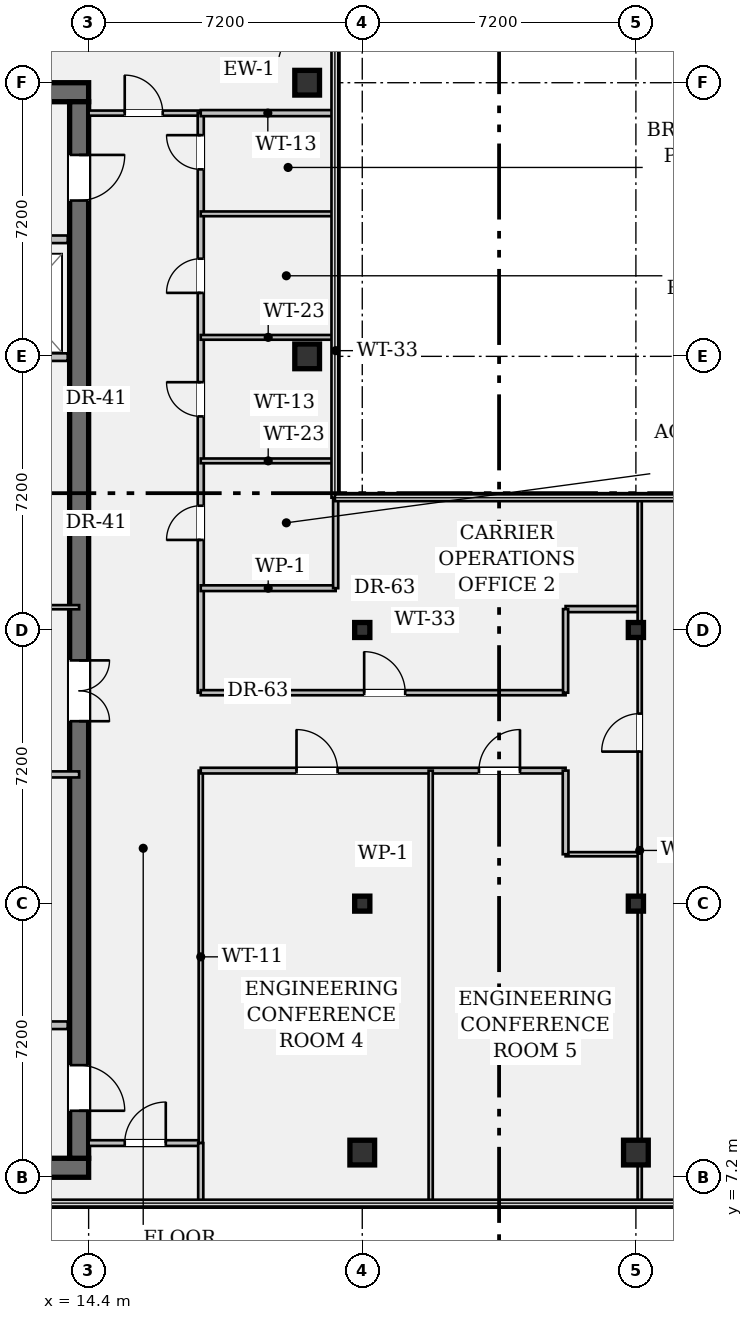
"""IFC4 building model, lengths in metres.
Left out: names, types, materials, properties, quantities, classifications, styles, units other than length and angle.
Written with IfcOpenShell. Run it as: python <this file> out.ifc"""

import sys

from ifc_helpers import new_model, si_unit, direction, frame, frame_2d, origin, origin_2d, place, context, subcontext, project, spatial, rectangle, hollow_rectangle, i_section, extrude, element, fill, save


model = new_model("IFC4")
c1 = context("Model", 3, precision=1e-05, world=origin(), true_north=direction((0.0, 1.0)))
c2 = subcontext(c1, "Body", "Model", "MODEL_VIEW")
j1 = project(units=[si_unit("LENGTHUNIT", "METRE"), si_unit("PLANEANGLEUNIT", "RADIAN")], contexts=[c1])
p1 = place(None, origin())
s1 = spatial("IfcSite", under=j1, at=p1, CompositionType="ELEMENT")
p2 = place(p1, origin())
s2 = spatial("IfcBuilding", under=s1, at=p2, CompositionType="ELEMENT")
p3 = place(p2, frame((0.0, 0.0, 265.65)))
s3 = spatial("IfcBuildingStorey", under=s2, at=p3, CompositionType="ELEMENT", Elevation=265.65)
for number, where, z_axis, x_axis in (
    (1, (0.5, 7.45, 0.0), (0.0, 0.0, 1.0), (1.0, 0.0, 0.0)),
    (2, (0.5, 35.75, 0.0), (0.0, 0.0, 1.0), (1.0, 0.0, 0.0)),
):
    element("IfcWall", number, at=place(p3, frame(where, z_axis=z_axis, x_axis=x_axis)), inside=s3, PredefinedType="SHEAR", context=c2, shape_type="SweptSolid", body=[
        extrude(rectangle(XDim=13.9, YDim=0.5, at=frame_2d((6.95, 0.0))), origin(), (0.0, 0.0, 1.0), 3.24),
    ])
p4 = place(p3, frame((14.15, 35.5, 0.0), z_axis=(0.0, 0.0, 1.0), x_axis=(0.0, -1.0, 0.0)))
e3 = element("IfcWall", 3, at=p4, inside=s3, PredefinedType="SHEAR", context=c2, shape_type="SweptSolid", body=[
    extrude(rectangle(XDim=27.8, YDim=0.5, at=frame_2d((13.9, 0.0))), origin(), (0.0, 0.0, 1.0), 3.24),
])
p5 = place(p4, frame((1.4, 0.0, 0.0)))
e4 = element("IfcOpeningElement", 4, at=p5, cuts=e3, PredefinedType="OPENING", context=c2, shape_type="SweptSolid", body=[
    extrude(rectangle(XDim=1.2, YDim=2.15, at=frame_2d((0.6, 1.075))), frame((0.0, 0.262, 0.0), z_axis=(0.0, -1.0, 0.0), x_axis=(1.0, 0.0, 0.0)), (0.0, 0.0, 1.0), 0.524),
])
p6 = place(p4, frame((25.35, 0.0, 0.0)))
e5 = element("IfcOpeningElement", 5, at=p6, cuts=e3, PredefinedType="OPENING", context=c2, shape_type="SweptSolid", body=[
    extrude(rectangle(XDim=1.2, YDim=2.15, at=frame_2d((0.6, 1.075))), frame((0.0, 0.262, 0.0), z_axis=(0.0, -1.0, 0.0), x_axis=(1.0, 0.0, 0.0)), (0.0, 0.0, 1.0), 0.524),
])
p7 = place(p4, frame((14.7, 0.0, 0.0)))
e6 = element("IfcOpeningElement", 6, at=p7, cuts=e3, PredefinedType="OPENING", context=c2, shape_type="SweptSolid", body=[
    extrude(rectangle(XDim=1.6, YDim=2.2, at=frame_2d((0.8, 1.1))), frame((0.0, 0.262, 0.0), z_axis=(0.0, -1.0, 0.0), x_axis=(1.0, 0.0, 0.0)), (0.0, 0.0, 1.0), 0.524),
])
for number, where, z_axis, x_axis in (
    (7, (20.15, 28.8, 0.0), (0.0, 0.0, 1.0), (1.0, 0.0, 0.0)),
    (8, (20.15, 36.0, 0.0), (0.0, 0.0, 1.0), (1.0, 0.0, 0.0)),
    (9, (21.6, 7.85, 0.0), (0.0, 0.0, 1.0), (1.0, 0.0, 0.0)),
):
    element("IfcColumn", number, at=place(p3, frame(where, z_axis=z_axis, x_axis=x_axis)), inside=s3, PredefinedType="COLUMN", context=c2, shape_type="SweptSolid", body=[
        extrude(hollow_rectangle(XDim=0.65, YDim=0.65, WallThickness=0.04, at=origin_2d()), origin(), (0.0, 0.0, 1.0), 3.24),
    ])
for number, where, z_axis, x_axis in (
    (10, (21.6, 14.4, 0.0), (0.0, 0.0, 1.0), (1.0, 0.0, 0.0)),
    (11, (21.6, 21.6, 0.0), (0.0, 0.0, 1.0), (1.0, 0.0, 0.0)),
):
    element("IfcColumn", number, at=place(p3, frame(where, z_axis=z_axis, x_axis=x_axis)), inside=s3, PredefinedType="COLUMN", context=c2, shape_type="SweptSolid", body=[
        extrude(i_section(OverallWidth=0.399, OverallDepth=0.394, WebThickness=0.023, FlangeThickness=0.037, FilletRadius=0.018, at=origin_2d()), origin(), (0.0, 0.0, 1.0), 3.24),
    ])
p8 = place(p3, frame((28.8, 7.85, 0.0), z_axis=(0.0, 0.0, 1.0), x_axis=(1.0, 0.0, 0.0)))
e12 = element("IfcColumn", 12, at=p8, inside=s3, PredefinedType="COLUMN", context=c2, shape_type="SweptSolid", body=[
    extrude(hollow_rectangle(XDim=0.65, YDim=0.65, WallThickness=0.04, at=origin_2d()), origin(), (0.0, 0.0, 1.0), 3.24),
])
for number, where, z_axis, x_axis in (
    (13, (28.8, 14.4, 0.0), (0.0, 0.0, 1.0), (1.0, 0.0, 0.0)),
    (14, (28.8, 21.6, 0.0), (0.0, 0.0, 1.0), (1.0, 0.0, 0.0)),
):
    element("IfcColumn", number, at=place(p3, frame(where, z_axis=z_axis, x_axis=x_axis)), inside=s3, PredefinedType="COLUMN", context=c2, shape_type="SweptSolid", body=[
        extrude(i_section(OverallWidth=0.399, OverallDepth=0.394, WebThickness=0.023, FlangeThickness=0.037, FilletRadius=0.018, at=origin_2d()), origin(), (0.0, 0.0, 1.0), 3.24),
    ])
p9 = place(p3, frame((8.7, 31.88, 0.0), z_axis=(0.0, 0.0, 1.0), x_axis=(1.0, 0.0, 0.0)))
e15 = element("IfcWall", 15, at=p9, inside=s3, PredefinedType="PARTITIONING", context=c2, shape_type="SweptSolid", body=[
    extrude(rectangle(XDim=5.15, YDim=0.2, at=frame_2d((2.575, 0.0))), origin(), (0.0, 0.0, 1.0), 3.24),
])
p10 = place(p9, frame((0.75, 0.0, 0.0)))
e16 = element("IfcOpeningElement", 16, at=p10, cuts=e15, PredefinedType="OPENING", context=c2, shape_type="SweptSolid", body=[
    extrude(rectangle(XDim=1.2, YDim=2.2, at=frame_2d((0.6, 1.1))), frame((0.0, 0.112, 0.0), z_axis=(0.0, -1.0, 0.0), x_axis=(1.0, 0.0, 0.0)), (0.0, 0.0, 1.0), 0.224),
])
p11 = place(p9, frame((3.25, 0.0, 0.0)))
e17 = element("IfcOpeningElement", 17, at=p11, cuts=e15, PredefinedType="OPENING", context=c2, shape_type="SweptSolid", body=[
    extrude(rectangle(XDim=1.2, YDim=2.2, at=frame_2d((0.6, 1.1))), frame((0.0, 0.112, 0.0), z_axis=(0.0, -1.0, 0.0), x_axis=(1.0, 0.0, 0.0)), (0.0, 0.0, 1.0), 0.224),
])
for number, where, z_axis, x_axis in (
    (18, (8.7, 11.2, 0.0), (0.0, 0.0, 1.0), (1.0, 0.0, 0.0)),
    (19, (8.7, 28.78, 0.0), (0.0, 0.0, 1.0), (1.0, 0.0, 0.0)),
):
    element("IfcWall", number, at=place(p3, frame(where, z_axis=z_axis, x_axis=x_axis)), inside=s3, PredefinedType="PARTITIONING", context=c2, shape_type="SweptSolid", body=[
        extrude(rectangle(XDim=5.15, YDim=0.2, at=frame_2d((2.575, 0.0))), origin(), (0.0, 0.0, 1.0), 3.24),
    ])
p12 = place(p3, frame((7.1, 22.2, 0.0), z_axis=(0.0, 0.0, 1.0), x_axis=(1.0, 0.0, 0.0)))
e20 = element("IfcWall", 20, at=p12, inside=s3, PredefinedType="PARTITIONING", context=c2, shape_type="SweptSolid", body=[
    extrude(rectangle(XDim=7.05, YDim=0.11, at=frame_2d((3.525, 0.0))), origin(), (0.0, 0.0, 1.0), 3.24),
])
p13 = place(p12, frame((2.4, 0.0, 0.0)))
e21 = element("IfcOpeningElement", 21, at=p13, cuts=e20, PredefinedType="OPENING", context=c2, shape_type="SweptSolid", body=[
    extrude(rectangle(XDim=1.0, YDim=2.15, at=frame_2d((0.5, 1.075))), frame((0.0, 0.067, 0.0), z_axis=(0.0, -1.0, 0.0), x_axis=(1.0, 0.0, 0.0)), (0.0, 0.0, 1.0), 0.134),
])
p14 = place(p3, frame((5.15, 17.8, 0.0), z_axis=(0.0, 0.0, 1.0), x_axis=(1.0, 0.0, 0.0)))
e22 = element("IfcWall", 22, at=p14, inside=s3, PredefinedType="PARTITIONING", context=c2, shape_type="SweptSolid", body=[
    extrude(rectangle(XDim=9.0, YDim=0.16, at=frame_2d((4.5, 0.0))), origin(), (0.0, 0.0, 1.0), 3.24),
])
p15 = place(p14, frame((2.65, 0.0, 0.0)))
e23 = element("IfcOpeningElement", 23, at=p15, cuts=e22, PredefinedType="OPENING", context=c2, shape_type="SweptSolid", body=[
    extrude(rectangle(XDim=0.9, YDim=2.15, at=frame_2d((0.45, 1.075))), frame((0.0, 0.092, 0.0), z_axis=(0.0, -1.0, 0.0), x_axis=(1.0, 0.0, 0.0)), (0.0, 0.0, 1.0), 0.184),
])
p16 = place(p14, frame((6.15, 0.0, 0.0)))
e24 = element("IfcOpeningElement", 24, at=p16, cuts=e22, PredefinedType="OPENING", context=c2, shape_type="SweptSolid", body=[
    extrude(rectangle(XDim=1.08, YDim=2.15, at=frame_2d((0.54, 1.075))), frame((0.0, 0.092, 0.0), z_axis=(0.0, -1.0, 0.0), x_axis=(1.0, 0.0, 0.0)), (0.0, 0.0, 1.0), 0.184),
])
p17 = place(p3, frame((14.4, 8.1, 0.0), z_axis=(0.0, 0.0, 1.0), x_axis=(1.0, 0.0, 0.0)))
e25 = element("IfcWall", 25, at=p17, inside=s3, PredefinedType="PARTITIONING", context=c2, shape_type="SweptSolid", body=[
    extrude(rectangle(XDim=2.95, YDim=0.15, at=frame_2d((1.475, 0.0))), origin(), (0.0, 0.0, 1.0), 3.24),
])
p18 = place(p17, frame((0.95, 0.0, 0.0)))
e26 = element("IfcOpeningElement", 26, at=p18, cuts=e25, PredefinedType="OPENING", context=c2, shape_type="SweptSolid", body=[
    extrude(rectangle(XDim=1.08, YDim=2.15, at=frame_2d((0.54, 1.075))), frame((0.0, 0.087, 0.0), z_axis=(0.0, -1.0, 0.0), x_axis=(1.0, 0.0, 0.0)), (0.0, 0.0, 1.0), 0.174),
])
p19 = place(p3, frame((14.4, 35.2, 0.0), z_axis=(0.0, 0.0, 1.0), x_axis=(1.0, 0.0, 0.0)))
e27 = element("IfcWall", 27, at=p19, inside=s3, PredefinedType="PARTITIONING", context=c2, shape_type="SweptSolid", body=[
    extrude(rectangle(XDim=2.95, YDim=0.135, at=frame_2d((1.475, 0.0))), origin(), (0.0, 0.0, 1.0), 2.808),
])
p20 = place(p19, frame((0.95, 0.0, 0.0)))
e28 = element("IfcOpeningElement", 28, at=p20, cuts=e27, PredefinedType="OPENING", context=c2, shape_type="SweptSolid", body=[
    extrude(rectangle(XDim=1.0, YDim=2.15, at=frame_2d((0.5, 1.075))), frame((0.0, 0.08, 0.0), z_axis=(0.0, -1.0, 0.0), x_axis=(1.0, 0.0, 0.0)), (0.0, 0.0, 1.0), 0.159),
])
p21 = place(p3, frame((17.35, 8.1, 0.0), z_axis=(0.0, 0.0, 1.0), x_axis=(0.0, 1.0, 0.0)))
e29 = element("IfcWall", 29, at=p21, inside=s3, PredefinedType="PARTITIONING", context=c2, shape_type="SweptSolid", body=[
    extrude(rectangle(XDim=9.8, YDim=0.11, at=frame_2d((4.9, 0.0))), origin(), (0.0, 0.0, 1.0), 2.676),
])
p22 = place(p3, frame((17.35, 19.95, 0.0), z_axis=(0.0, 0.0, 1.0), x_axis=(0.0, 1.0, 0.0)))
e30 = element("IfcWall", 30, at=p22, inside=s3, PredefinedType="PARTITIONING", context=c2, shape_type="SweptSolid", body=[
    extrude(rectangle(XDim=15.25, YDim=0.16, at=frame_2d((7.625, 0.0))), origin(), (0.0, 0.0, 1.0), 2.676),
])
p23 = place(p22, frame((4.02, 0.0, 0.0)))
e31 = element("IfcOpeningElement", 31, at=p23, cuts=e30, PredefinedType="OPENING", context=c2, shape_type="SweptSolid", body=[
    extrude(rectangle(XDim=0.9, YDim=2.15, at=frame_2d((0.45, 1.075))), frame((0.0, 0.092, 0.0), z_axis=(0.0, -1.0, 0.0), x_axis=(1.0, 0.0, 0.0)), (0.0, 0.0, 1.0), 0.184),
])
p24 = place(p22, frame((7.27, 0.0, 0.0)))
e32 = element("IfcOpeningElement", 32, at=p24, cuts=e30, PredefinedType="OPENING", context=c2, shape_type="SweptSolid", body=[
    extrude(rectangle(XDim=0.9, YDim=2.15, at=frame_2d((0.45, 1.075))), frame((0.0, 0.092, 0.0), z_axis=(0.0, -1.0, 0.0), x_axis=(1.0, 0.0, 0.0)), (0.0, 0.0, 1.0), 0.184),
])
p25 = place(p22, frame((10.52, 0.0, 0.0)))
e33 = element("IfcOpeningElement", 33, at=p25, cuts=e30, PredefinedType="OPENING", context=c2, shape_type="SweptSolid", body=[
    extrude(rectangle(XDim=0.9, YDim=2.15, at=frame_2d((0.45, 1.075))), frame((0.0, 0.092, 0.0), z_axis=(0.0, -1.0, 0.0), x_axis=(1.0, 0.0, 0.0)), (0.0, 0.0, 1.0), 0.184),
])
p26 = place(p22, frame((13.77, 0.0, 0.0)))
e34 = element("IfcOpeningElement", 34, at=p26, cuts=e30, PredefinedType="OPENING", context=c2, shape_type="SweptSolid", body=[
    extrude(rectangle(XDim=0.9, YDim=2.15, at=frame_2d((0.45, 1.075))), frame((0.0, 0.092, 0.0), z_axis=(0.0, -1.0, 0.0), x_axis=(1.0, 0.0, 0.0)), (0.0, 0.0, 1.0), 0.184),
])
p27 = place(p3, frame((17.35, 17.9, 0.0), z_axis=(0.0, 0.0, 1.0), x_axis=(1.0, 0.0, 0.0)))
e35 = element("IfcWall", 35, at=p27, inside=s3, PredefinedType="PARTITIONING", context=c2, shape_type="SweptSolid", body=[
    extrude(rectangle(XDim=9.6, YDim=0.15, at=frame_2d((4.8, 0.0))), origin(), (0.0, 0.0, 1.0), 2.676),
])
p28 = place(p27, frame((2.52, 0.0, 0.0)))
e36 = element("IfcOpeningElement", 36, at=p28, cuts=e35, PredefinedType="OPENING", context=c2, shape_type="SweptSolid", body=[
    extrude(rectangle(XDim=1.08, YDim=2.15, at=frame_2d((0.54, 1.075))), frame((0.0, 0.087, 0.0), z_axis=(0.0, -1.0, 0.0), x_axis=(1.0, 0.0, 0.0)), (0.0, 0.0, 1.0), 0.174),
])
p29 = place(p27, frame((7.32, 0.0, 0.0)))
e37 = element("IfcOpeningElement", 37, at=p29, cuts=e35, PredefinedType="OPENING", context=c2, shape_type="SweptSolid", body=[
    extrude(rectangle(XDim=1.08, YDim=2.15, at=frame_2d((0.54, 1.075))), frame((0.0, 0.087, 0.0), z_axis=(0.0, -1.0, 0.0), x_axis=(1.0, 0.0, 0.0)), (0.0, 0.0, 1.0), 0.174),
])
p30 = place(p3, frame((17.35, 19.95, 0.0), z_axis=(0.0, 0.0, 1.0), x_axis=(1.0, 0.0, 0.0)))
e38 = element("IfcWall", 38, at=p30, inside=s3, PredefinedType="PARTITIONING", context=c2, shape_type="SweptSolid", body=[
    extrude(rectangle(XDim=9.6, YDim=0.135, at=frame_2d((4.8, 0.0))), origin(), (0.0, 0.0, 1.0), 2.676),
])
p31 = place(p30, frame((4.3, 0.0, 0.0)))
e39 = element("IfcOpeningElement", 39, at=p31, cuts=e38, PredefinedType="OPENING", context=c2, shape_type="SweptSolid", body=[
    extrude(rectangle(XDim=1.08, YDim=2.15, at=frame_2d((0.54, 1.075))), frame((0.0, 0.08, 0.0), z_axis=(0.0, -1.0, 0.0), x_axis=(1.0, 0.0, 0.0)), (0.0, 0.0, 1.0), 0.159),
])
p32 = place(p3, frame((26.95, 15.7, 0.0), z_axis=(0.0, 0.0, 1.0), x_axis=(1.0, 0.0, 0.0)))
e40 = element("IfcWall", 40, at=p32, inside=s3, PredefinedType="PARTITIONING", context=c2, shape_type="SweptSolid", body=[
    extrude(rectangle(XDim=1.95, YDim=0.11, at=frame_2d((0.975, 0.0))), origin(), (0.0, 0.0, 1.0), 2.676),
])
p33 = place(p3, frame((26.95, 22.15, 0.0), z_axis=(0.0, 0.0, 1.0), x_axis=(1.0, 0.0, 0.0)))
e41 = element("IfcWall", 41, at=p33, inside=s3, PredefinedType="PARTITIONING", context=c2, shape_type="SweptSolid", body=[
    extrude(rectangle(XDim=1.95, YDim=0.16, at=frame_2d((0.975, 0.0))), origin(), (0.0, 0.0, 1.0), 3.24),
])
p34 = place(p3, frame((26.95, 15.7, 0.0), z_axis=(0.0, 0.0, 1.0), x_axis=(0.0, 1.0, 0.0)))
e42 = element("IfcWall", 42, at=p34, inside=s3, PredefinedType="PARTITIONING", context=c2, shape_type="SweptSolid", body=[
    extrude(rectangle(XDim=2.2, YDim=0.15, at=frame_2d((1.1, 0.0))), origin(), (0.0, 0.0, 1.0), 3.24),
])
p35 = place(p3, frame((26.95, 19.95, 0.0), z_axis=(0.0, 0.0, 1.0), x_axis=(0.0, 1.0, 0.0)))
e43 = element("IfcWall", 43, at=p35, inside=s3, PredefinedType="PARTITIONING", context=c2, shape_type="SweptSolid", body=[
    extrude(rectangle(XDim=2.2, YDim=0.135, at=frame_2d((1.1, 0.0))), origin(), (0.0, 0.0, 1.0), 2.676),
])
p36 = place(p3, frame((28.9, 6.52, 0.0), z_axis=(0.0, 0.0, 1.0), x_axis=(0.0, 1.0, 0.0)))
e44 = element("IfcWall", 44, at=p36, inside=s3, PredefinedType="PARTITIONING", context=c2, shape_type="SweptSolid", body=[
    extrude(rectangle(XDim=18.56, YDim=0.11, at=frame_2d((9.28, 0.0))), origin(), (0.0, 0.0, 1.0), 2.676),
])
p37 = place(p36, frame((11.88, 0.0, 0.0)))
e45 = element("IfcOpeningElement", 45, at=p37, cuts=e44, PredefinedType="OPENING", context=c2, shape_type="SweptSolid", body=[
    extrude(rectangle(XDim=1.0, YDim=2.15, at=frame_2d((0.5, 1.075))), frame((0.0, 0.067, 0.0), z_axis=(0.0, -1.0, 0.0), x_axis=(1.0, 0.0, 0.0)), (0.0, 0.0, 1.0), 0.134),
])
p38 = place(p3, frame((17.35, 35.2, 0.0), z_axis=(0.0, 0.0, 1.0), x_axis=(1.0, 0.0, 0.0)))
e46 = element("IfcWall", 46, at=p38, inside=s3, PredefinedType="PARTITIONING", context=c2, shape_type="SweptSolid", body=[
    extrude(rectangle(XDim=3.53, YDim=0.16, at=frame_2d((1.765, 0.0))), origin(), (0.0, 0.0, 1.0), 2.808),
])
p39 = place(p3, frame((17.35, 22.7, 0.0), z_axis=(0.0, 0.0, 1.0), x_axis=(1.0, 0.0, 0.0)))
e47 = element("IfcWall", 47, at=p39, inside=s3, PredefinedType="PARTITIONING", context=c2, shape_type="SweptSolid", body=[
    extrude(rectangle(XDim=3.55, YDim=0.15, at=frame_2d((1.775, 0.0))), origin(), (0.0, 0.0, 1.0), 2.808),
])
p40 = place(p3, frame((20.9, 22.7, 0.0), z_axis=(0.0, 0.0, 1.0), x_axis=(0.0, 1.0, 0.0)))
e48 = element("IfcWall", 48, at=p40, inside=s3, PredefinedType="PARTITIONING", context=c2, shape_type="SweptSolid", body=[
    extrude(rectangle(XDim=12.5, YDim=0.135, at=frame_2d((6.25, 0.0))), origin(), (0.0, 0.0, 1.0), 3.24),
])
for number, where, z_axis, x_axis in (
    (49, (17.35, 26.05, 0.0), (0.0, 0.0, 1.0), (1.0, 0.0, 0.0)),
    (50, (17.35, 29.3, 0.0), (0.0, 0.0, 1.0), (1.0, 0.0, 0.0)),
    (51, (17.35, 32.55, 0.0), (0.0, 0.0, 1.0), (1.0, 0.0, 0.0)),
):
    element("IfcWall", number, at=place(p3, frame(where, z_axis=z_axis, x_axis=x_axis)), inside=s3, PredefinedType="PARTITIONING", context=c2, shape_type="SweptSolid", body=[
        extrude(rectangle(XDim=3.55, YDim=0.125, at=frame_2d((1.775, 0.0))), origin(), (0.0, 0.0, 1.0), 2.808),
    ])
p41 = place(p3, frame((17.35, 6.52, 0.0), z_axis=(0.0, 0.0, 1.0), x_axis=(0.0, 1.0, 0.0)))
e52 = element("IfcWall", 52, at=p41, inside=s3, PredefinedType="PARTITIONING", context=c2, shape_type="SweptSolid", body=[
    extrude(rectangle(XDim=1.58, YDim=0.135, at=frame_2d((0.79, 0.0))), origin(), (0.0, 0.0, 1.0), 3.24),
])
p42 = place(p3, frame((23.4, 6.52, 0.0), z_axis=(0.0, 0.0, 1.0), x_axis=(0.0, 1.0, 0.0)))
e53 = element("IfcWall", 53, at=p42, inside=s3, PredefinedType="PARTITIONING", context=c2, shape_type="SweptSolid", body=[
    extrude(rectangle(XDim=11.38, YDim=0.11, at=frame_2d((5.69, 0.0))), origin(), (0.0, 0.0, 1.0), 2.676),
])
p43 = place(p5, origin())
e54 = element("IfcDoor", 54, at=p43, inside=s3, OperationType="SINGLE_SWING_LEFT", PredefinedType="DOOR", context=c2, shape_type="SweptSolid", body=[
    extrude(rectangle(XDim=1.2, YDim=2.15, at=frame_2d((0.6, 1.075))), frame((0.0, 0.025, 0.0), z_axis=(0.0, -1.0, 0.0), x_axis=(1.0, 0.0, 0.0)), (0.0, 0.0, 1.0), 0.05),
])
fill(e4, e54)
p44 = place(p6, origin())
e55 = element("IfcDoor", 55, at=p44, inside=s3, OperationType="SINGLE_SWING_RIGHT", PredefinedType="DOOR", context=c2, shape_type="SweptSolid", body=[
    extrude(rectangle(XDim=1.2, YDim=2.15, at=frame_2d((0.6, 1.075))), frame((0.0, 0.025, 0.0), z_axis=(0.0, -1.0, 0.0), x_axis=(1.0, 0.0, 0.0)), (0.0, 0.0, 1.0), 0.05),
])
fill(e5, e55)
p45 = place(p7, origin())
e56 = element("IfcDoor", 56, at=p45, inside=s3, OperationType="DOUBLE_DOOR_SINGLE_SWING", PredefinedType="DOOR", context=c2, shape_type="SweptSolid", body=[
    extrude(rectangle(XDim=1.6, YDim=2.2, at=frame_2d((0.8, 1.1))), frame((0.0, 0.025, 0.0), z_axis=(0.0, -1.0, 0.0), x_axis=(1.0, 0.0, 0.0)), (0.0, 0.0, 1.0), 0.05),
])
fill(e6, e56)
p46 = place(p20, origin())
e57 = element("IfcDoor", 57, at=p46, inside=s3, OperationType="SINGLE_SWING_LEFT", PredefinedType="DOOR", context=c2, shape_type="SweptSolid", body=[
    extrude(rectangle(XDim=1.0, YDim=2.15, at=frame_2d((0.5, 1.075))), frame((0.0, 0.025, 0.0), z_axis=(0.0, -1.0, 0.0), x_axis=(1.0, 0.0, 0.0)), (0.0, 0.0, 1.0), 0.05),
])
fill(e28, e57)
p47 = place(p23, origin())
e58 = element("IfcDoor", 58, at=p47, inside=s3, OperationType="SINGLE_SWING_LEFT", PredefinedType="DOOR", context=c2, shape_type="SweptSolid", body=[
    extrude(rectangle(XDim=0.9, YDim=2.15, at=frame_2d((0.45, 1.075))), frame((0.0, 0.025, 0.0), z_axis=(0.0, -1.0, 0.0), x_axis=(1.0, 0.0, 0.0)), (0.0, 0.0, 1.0), 0.05),
])
fill(e31, e58)
p48 = place(p24, origin())
e59 = element("IfcDoor", 59, at=p48, inside=s3, OperationType="SINGLE_SWING_RIGHT", PredefinedType="DOOR", context=c2, shape_type="SweptSolid", body=[
    extrude(rectangle(XDim=0.9, YDim=2.15, at=frame_2d((0.45, 1.075))), frame((0.0, 0.025, 0.0), z_axis=(0.0, -1.0, 0.0), x_axis=(1.0, 0.0, 0.0)), (0.0, 0.0, 1.0), 0.05),
])
fill(e32, e59)
p49 = place(p25, origin())
e60 = element("IfcDoor", 60, at=p49, inside=s3, OperationType="SINGLE_SWING_LEFT", PredefinedType="DOOR", context=c2, shape_type="SweptSolid", body=[
    extrude(rectangle(XDim=0.9, YDim=2.15, at=frame_2d((0.45, 1.075))), frame((0.0, 0.025, 0.0), z_axis=(0.0, -1.0, 0.0), x_axis=(1.0, 0.0, 0.0)), (0.0, 0.0, 1.0), 0.05),
])
fill(e33, e60)
p50 = place(p26, origin())
e61 = element("IfcDoor", 61, at=p50, inside=s3, OperationType="SINGLE_SWING_RIGHT", PredefinedType="DOOR", context=c2, shape_type="SweptSolid", body=[
    extrude(rectangle(XDim=0.9, YDim=2.15, at=frame_2d((0.45, 1.075))), frame((0.0, 0.025, 0.0), z_axis=(0.0, -1.0, 0.0), x_axis=(1.0, 0.0, 0.0)), (0.0, 0.0, 1.0), 0.05),
])
fill(e34, e61)
p51 = place(p31, origin())
e62 = element("IfcDoor", 62, at=p51, inside=s3, OperationType="SINGLE_SWING_LEFT", PredefinedType="DOOR", context=c2, shape_type="SweptSolid", body=[
    extrude(rectangle(XDim=1.08, YDim=2.15, at=frame_2d((0.54, 1.075))), frame((0.0, 0.025, 0.0), z_axis=(0.0, -1.0, 0.0), x_axis=(1.0, 0.0, 0.0)), (0.0, 0.0, 1.0), 0.05),
])
fill(e39, e62)
p52 = place(p18, origin())
e63 = element("IfcDoor", 63, at=p52, inside=s3, OperationType="SINGLE_SWING_RIGHT", PredefinedType="DOOR", context=c2, shape_type="SweptSolid", body=[
    extrude(rectangle(XDim=1.08, YDim=2.15, at=frame_2d((0.54, 1.075))), frame((0.0, 0.025, 0.0), z_axis=(0.0, -1.0, 0.0), x_axis=(1.0, 0.0, 0.0)), (0.0, 0.0, 1.0), 0.05),
])
fill(e26, e63)
p53 = place(p28, origin())
e64 = element("IfcDoor", 64, at=p53, inside=s3, OperationType="SINGLE_SWING_LEFT", PredefinedType="DOOR", context=c2, shape_type="SweptSolid", body=[
    extrude(rectangle(XDim=1.08, YDim=2.15, at=frame_2d((0.54, 1.075))), frame((0.0, 0.025, 0.0), z_axis=(0.0, -1.0, 0.0), x_axis=(1.0, 0.0, 0.0)), (0.0, 0.0, 1.0), 0.05),
])
fill(e36, e64)
p54 = place(p29, origin())
e65 = element("IfcDoor", 65, at=p54, inside=s3, OperationType="SINGLE_SWING_RIGHT", PredefinedType="DOOR", context=c2, shape_type="SweptSolid", body=[
    extrude(rectangle(XDim=1.08, YDim=2.15, at=frame_2d((0.54, 1.075))), frame((0.0, 0.025, 0.0), z_axis=(0.0, -1.0, 0.0), x_axis=(1.0, 0.0, 0.0)), (0.0, 0.0, 1.0), 0.05),
])
fill(e37, e65)
p55 = place(p37, origin())
e66 = element("IfcDoor", 66, at=p55, inside=s3, OperationType="SINGLE_SWING_LEFT", PredefinedType="DOOR", context=c2, shape_type="SweptSolid", body=[
    extrude(rectangle(XDim=1.0, YDim=2.15, at=frame_2d((0.5, 1.075))), frame((0.0, 0.025, 0.0), z_axis=(0.0, -1.0, 0.0), x_axis=(1.0, 0.0, 0.0)), (0.0, 0.0, 1.0), 0.05),
])
fill(e45, e66)
save(model, sys.argv[1])
